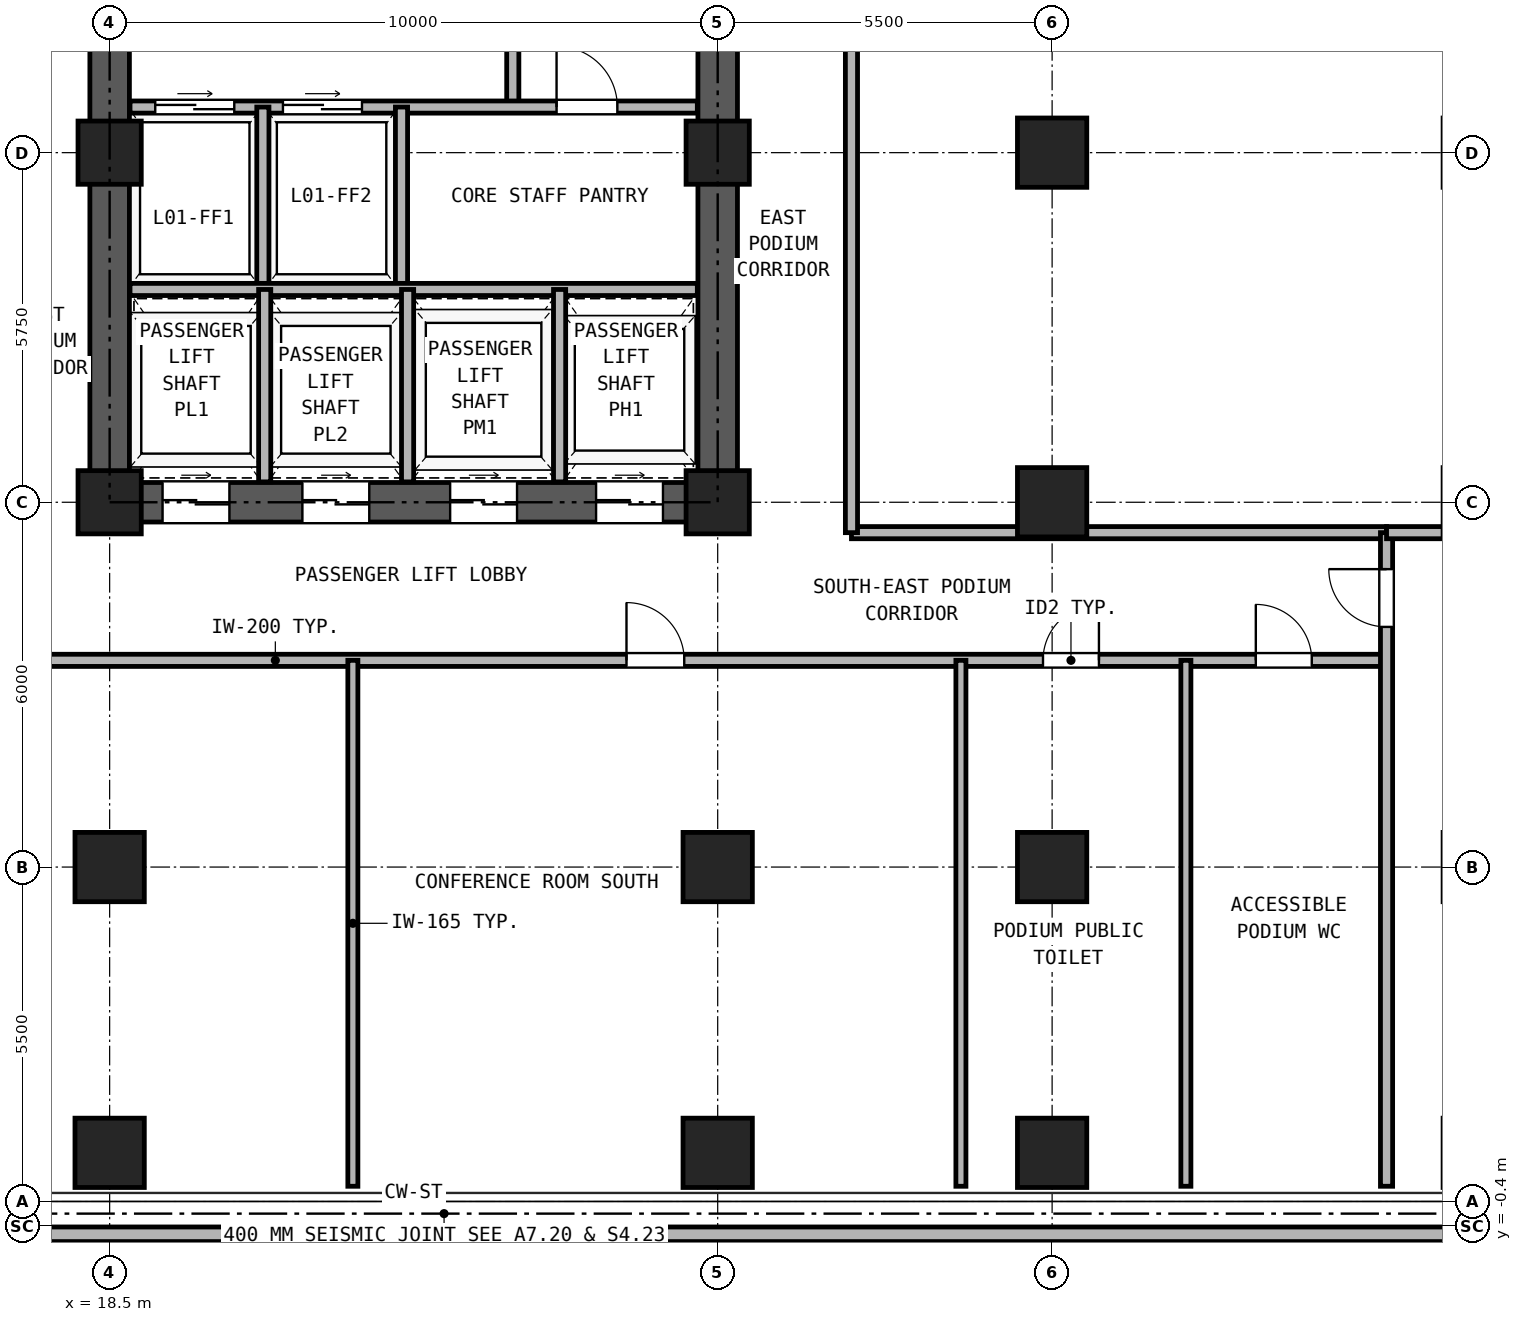
"""IFC4 building model, lengths in metres.
Left out: names, types, materials, properties, quantities, classifications, styles, units other than length and angle.
Written with IfcOpenShell. Run it as: python <this file> out.ifc"""

import sys

from ifc_helpers import new_model, si_unit, direction, frame, frame_2d, origin, origin_2d, place, context, subcontext, project, spatial, rectangle, hollow_rectangle, extrude, source, transform, mapped, element, fill, save


model = new_model("IFC4")
c1 = context("Model", 3, precision=1e-05, world=origin(), true_north=direction((0.0, 1.0)))
c2 = subcontext(c1, "Body", "Model", "MODEL_VIEW")
j1 = project(units=[si_unit("LENGTHUNIT", "METRE"), si_unit("PLANEANGLEUNIT", "RADIAN")], contexts=[c1])
p1 = place(None, origin())
s1 = spatial("IfcSite", under=j1, at=p1, CompositionType="ELEMENT")
p2 = place(p1, origin())
s2 = spatial("IfcBuilding", under=s1, at=p2, CompositionType="ELEMENT")
p3 = place(p2, frame((0.0, 0.0, 4.5)))
s3 = spatial("IfcBuildingStorey", under=s2, at=p3, CompositionType="ELEMENT", Elevation=4.5)
m1 = source(origin(), c2, "Body", "SweptSolid", [
    extrude(hollow_rectangle(XDim=1.14, YDim=1.14, WallThickness=0.07, at=origin_2d()), origin(), (0.0, 0.0, 1.0), 4.18),
])
for number, where, z_axis, x_axis in (
    (1, (18.5, 0.8, 0.0), (0.0, 0.0, 1.0), (1.0, 0.0, 0.0)),
    (2, (28.5, 0.8, 0.0), (0.0, 0.0, 1.0), (1.0, 0.0, 0.0)),
    (3, (34.0, 0.8, 0.0), (0.0, 0.0, 1.0), (1.0, 0.0, 0.0)),
    (4, (18.5, 5.5, 0.0), (0.0, 0.0, 1.0), (1.0, 0.0, 0.0)),
):
    element("IfcColumn", number, at=place(p3, frame(where, z_axis=z_axis, x_axis=x_axis)), inside=s3, PredefinedType="COLUMN", context=c2, shape_type="MappedRepresentation", body=[
        mapped(m1, transform((0.0, 0.0, 0.0), x_axis=(1.0, 0.0, 0.0), y_axis=(0.0, 1.0, 0.0), z_axis=(0.0, 0.0, 1.0), scale=1.0)),
    ])
m2 = source(origin(), c2, "Body", "SweptSolid", [
    extrude(hollow_rectangle(XDim=1.04, YDim=1.04, WallThickness=0.065, at=origin_2d()), origin(), (0.0, 0.0, 1.0), 4.18),
])
for number, where, z_axis, x_axis in (
    (5, (18.5, 11.5, 0.0), (0.0, 0.0, 1.0), (1.0, 0.0, 0.0)),
    (6, (18.5, 17.25, 0.0), (0.0, 0.0, 1.0), (1.0, 0.0, 0.0)),
):
    element("IfcColumn", number, at=place(p3, frame(where, z_axis=z_axis, x_axis=x_axis)), inside=s3, PredefinedType="COLUMN", context=c2, shape_type="MappedRepresentation", body=[
        mapped(m2, transform((0.0, 0.0, 0.0), x_axis=(1.0, 0.0, 0.0), y_axis=(0.0, 1.0, 0.0), z_axis=(0.0, 0.0, 1.0), scale=1.0)),
    ])
p4 = place(p3, frame((28.5, 5.5, 0.0), z_axis=(0.0, 0.0, 1.0), x_axis=(1.0, 0.0, 0.0)))
e7 = element("IfcColumn", 7, at=p4, inside=s3, PredefinedType="COLUMN", context=c2, shape_type="MappedRepresentation", body=[
    mapped(m1, transform((0.0, 0.0, 0.0), x_axis=(1.0, 0.0, 0.0), y_axis=(0.0, 1.0, 0.0), z_axis=(0.0, 0.0, 1.0), scale=1.0)),
])
for number, where, z_axis, x_axis in (
    (8, (28.5, 11.5, 0.0), (0.0, 0.0, 1.0), (1.0, 0.0, 0.0)),
    (9, (28.5, 17.25, 0.0), (0.0, 0.0, 1.0), (1.0, 0.0, 0.0)),
):
    element("IfcColumn", number, at=place(p3, frame(where, z_axis=z_axis, x_axis=x_axis)), inside=s3, PredefinedType="COLUMN", context=c2, shape_type="MappedRepresentation", body=[
        mapped(m2, transform((0.0, 0.0, 0.0), x_axis=(1.0, 0.0, 0.0), y_axis=(0.0, 1.0, 0.0), z_axis=(0.0, 0.0, 1.0), scale=1.0)),
    ])
for number, where, z_axis, x_axis in (
    (10, (34.0, 5.5, 0.0), (0.0, 0.0, 1.0), (1.0, 0.0, 0.0)),
    (11, (34.0, 11.5, 0.0), (0.0, 0.0, 1.0), (1.0, 0.0, 0.0)),
    (12, (34.0, 17.25, 0.0), (0.0, 0.0, 1.0), (1.0, 0.0, 0.0)),
):
    element("IfcColumn", number, at=place(p3, frame(where, z_axis=z_axis, x_axis=x_axis)), inside=s3, PredefinedType="COLUMN", context=c2, shape_type="MappedRepresentation", body=[
        mapped(m1, transform((0.0, 0.0, 0.0), x_axis=(1.0, 0.0, 0.0), y_axis=(0.0, 1.0, 0.0), z_axis=(0.0, 0.0, 1.0), scale=1.0)),
    ])
p5 = place(p3, frame((0.2, -0.54, 0.0), z_axis=(0.0, 0.0, 1.0), x_axis=(1.0, 0.0, 0.0)))
e13 = element("IfcWall", 13, at=p5, inside=s3, PredefinedType="SOLIDWALL", context=c2, shape_type="SweptSolid", body=[
    extrude(rectangle(XDim=47.34, YDim=0.24, at=frame_2d((23.67, 0.0))), origin(), (0.0, 0.0, 1.0), 4.18),
])
p6 = place(p3, frame((18.175, 11.5, 0.0), z_axis=(0.0, 0.0, 1.0), x_axis=(1.0, 0.0, 0.0)))
e14 = element("IfcWall", 14, at=p6, inside=s3, PredefinedType="SHEAR", context=c2, shape_type="SweptSolid", body=[
    extrude(rectangle(XDim=10.65, YDim=0.65, at=frame_2d((5.325, 0.0))), origin(), (0.0, 0.0, 1.0), 4.18),
])
p7 = place(p6, frame((1.195, 0.0, 0.0)))
e15 = element("IfcOpeningElement", 15, at=p7, cuts=e14, PredefinedType="OPENING", context=c2, shape_type="SweptSolid", body=[
    extrude(rectangle(XDim=1.1, YDim=2.25, at=frame_2d((0.55, 1.125))), frame((0.0, 0.335, 0.0), z_axis=(0.0, -1.0, 0.0), x_axis=(1.0, 0.0, 0.0)), (0.0, 0.0, 1.0), 0.67),
])
p8 = place(p6, frame((3.495, 0.0, 0.0)))
e16 = element("IfcOpeningElement", 16, at=p8, cuts=e14, PredefinedType="OPENING", context=c2, shape_type="SweptSolid", body=[
    extrude(rectangle(XDim=1.1, YDim=2.25, at=frame_2d((0.55, 1.125))), frame((0.0, 0.335, 0.0), z_axis=(0.0, -1.0, 0.0), x_axis=(1.0, 0.0, 0.0)), (0.0, 0.0, 1.0), 0.67),
])
p9 = place(p6, frame((5.925, 0.0, 0.0)))
e17 = element("IfcOpeningElement", 17, at=p9, cuts=e14, PredefinedType="OPENING", context=c2, shape_type="SweptSolid", body=[
    extrude(rectangle(XDim=1.1, YDim=2.25, at=frame_2d((0.55, 1.125))), frame((0.0, 0.335, 0.0), z_axis=(0.0, -1.0, 0.0), x_axis=(1.0, 0.0, 0.0)), (0.0, 0.0, 1.0), 0.67),
])
p10 = place(p6, frame((8.325, 0.0, 0.0)))
e18 = element("IfcOpeningElement", 18, at=p10, cuts=e14, PredefinedType="OPENING", context=c2, shape_type="SweptSolid", body=[
    extrude(rectangle(XDim=1.1, YDim=2.25, at=frame_2d((0.55, 1.125))), frame((0.0, 0.335, 0.0), z_axis=(0.0, -1.0, 0.0), x_axis=(1.0, 0.0, 0.0)), (0.0, 0.0, 1.0), 0.67),
])
p11 = place(p3, frame((18.5, 11.825, 0.0), z_axis=(0.0, 0.0, 1.0), x_axis=(0.0, 1.0, 0.0)))
e19 = element("IfcWall", 19, at=p11, inside=s3, PredefinedType="SHEAR", context=c2, shape_type="SweptSolid", body=[
    extrude(rectangle(XDim=16.6, YDim=0.65, at=frame_2d((8.3, 0.0))), origin(), (0.0, 0.0, 1.0), 4.18),
])
p12 = place(p11, frame((7.325, 0.0, 0.0)))
e20 = element("IfcOpeningElement", 20, at=p12, cuts=e19, PredefinedType="OPENING", context=c2, shape_type="SweptSolid", body=[
    extrude(rectangle(XDim=1.15, YDim=2.2, at=frame_2d((0.575, 1.1))), frame((0.0, 0.335, 0.0), z_axis=(0.0, -1.0, 0.0), x_axis=(1.0, 0.0, 0.0)), (0.0, 0.0, 1.0), 0.67),
])
p13 = place(p3, frame((28.5, 11.825, 0.0), z_axis=(0.0, 0.0, 1.0), x_axis=(0.0, 1.0, 0.0)))
e21 = element("IfcWall", 21, at=p13, inside=s3, PredefinedType="SHEAR", context=c2, shape_type="SweptSolid", body=[
    extrude(rectangle(XDim=16.6, YDim=0.65, at=frame_2d((8.3, 0.0))), origin(), (0.0, 0.0, 1.0), 4.18),
])
p14 = place(p13, frame((7.325, 0.0, 0.0)))
e22 = element("IfcOpeningElement", 22, at=p14, cuts=e21, PredefinedType="OPENING", context=c2, shape_type="SweptSolid", body=[
    extrude(rectangle(XDim=1.15, YDim=2.2, at=frame_2d((0.575, 1.1))), frame((0.0, 0.335, 0.0), z_axis=(0.0, -1.0, 0.0), x_axis=(1.0, 0.0, 0.0)), (0.0, 0.0, 1.0), 0.67),
])
p15 = place(p3, frame((25.13, 18.0, 0.0), z_axis=(0.0, 0.0, 1.0), x_axis=(0.0, 1.0, 0.0)))
e23 = element("IfcWall", 23, at=p15, inside=s3, PredefinedType="PARTITIONING", context=c2, shape_type="SweptSolid", body=[
    extrude(rectangle(XDim=3.39, YDim=0.2, at=frame_2d((1.695, 0.0))), origin(), (0.0, 0.0, 1.0), 4.18),
])
p16 = place(p15, frame((1.1, 0.0, 0.0)))
e24 = element("IfcOpeningElement", 24, at=p16, cuts=e23, PredefinedType="OPENING", context=c2, shape_type="SweptSolid", body=[
    extrude(rectangle(XDim=1.15, YDim=2.2, at=frame_2d((0.575, 1.1))), frame((0.0, 0.11, 0.0), z_axis=(0.0, -1.0, 0.0), x_axis=(1.0, 0.0, 0.0)), (0.0, 0.0, 1.0), 0.22),
])
p17 = place(p3, frame((18.835, 18.0, 0.0), z_axis=(0.0, 0.0, 1.0), x_axis=(1.0, 0.0, 0.0)))
e25 = element("IfcWall", 25, at=p17, inside=s3, PredefinedType="PARTITIONING", context=c2, shape_type="SweptSolid", body=[
    extrude(rectangle(XDim=9.33, YDim=0.2, at=frame_2d((4.665, 0.0))), origin(), (0.0, 0.0, 1.0), 4.18),
])
p18 = place(p17, frame((0.415, 0.0, 0.0)))
e26 = element("IfcOpeningElement", 26, at=p18, cuts=e25, PredefinedType="OPENING", context=c2, shape_type="SweptSolid", body=[
    extrude(rectangle(XDim=1.3, YDim=2.3, at=frame_2d((0.65, 1.15))), frame((0.0, 0.11, 0.0), z_axis=(0.0, -1.0, 0.0), x_axis=(1.0, 0.0, 0.0)), (0.0, 0.0, 1.0), 0.22),
])
p19 = place(p17, frame((2.515, 0.0, 0.0)))
e27 = element("IfcOpeningElement", 27, at=p19, cuts=e25, PredefinedType="OPENING", context=c2, shape_type="SweptSolid", body=[
    extrude(rectangle(XDim=1.3, YDim=2.3, at=frame_2d((0.65, 1.15))), frame((0.0, 0.11, 0.0), z_axis=(0.0, -1.0, 0.0), x_axis=(1.0, 0.0, 0.0)), (0.0, 0.0, 1.0), 0.22),
])
p20 = place(p17, frame((7.015, 0.0, 0.0)))
e28 = element("IfcOpeningElement", 28, at=p20, cuts=e25, PredefinedType="OPENING", context=c2, shape_type="SweptSolid", body=[
    extrude(rectangle(XDim=1.0, YDim=2.15, at=frame_2d((0.5, 1.075))), frame((0.0, 0.11, 0.0), z_axis=(0.0, -1.0, 0.0), x_axis=(1.0, 0.0, 0.0)), (0.0, 0.0, 1.0), 0.22),
])
for number, where, z_axis, x_axis in (
    (29, (21.02, 15.0, 0.0), (0.0, 0.0, 1.0), (0.0, 1.0, 0.0)),
    (30, (23.3, 15.0, 0.0), (0.0, 0.0, 1.0), (0.0, 1.0, 0.0)),
):
    element("IfcWall", number, at=place(p3, frame(where, z_axis=z_axis, x_axis=x_axis)), inside=s3, PredefinedType="PARTITIONING", context=c2, shape_type="SweptSolid", body=[
        extrude(rectangle(XDim=3.0, YDim=0.2, at=frame_2d((1.5, 0.0))), origin(), (0.0, 0.0, 1.0), 4.18),
    ])
p21 = place(p3, frame((18.835, 15.0, 0.0), z_axis=(0.0, 0.0, 1.0), x_axis=(1.0, 0.0, 0.0)))
e31 = element("IfcWall", 31, at=p21, inside=s3, PredefinedType="PARTITIONING", context=c2, shape_type="SweptSolid", body=[
    extrude(rectangle(XDim=9.33, YDim=0.2, at=frame_2d((4.665, 0.0))), origin(), (0.0, 0.0, 1.0), 4.18),
])
for number, where, z_axis, x_axis in (
    (32, (21.05, 11.835, 0.0), (0.0, 0.0, 1.0), (0.0, 1.0, 0.0)),
    (33, (23.4, 11.835, 0.0), (0.0, 0.0, 1.0), (0.0, 1.0, 0.0)),
    (34, (25.9, 11.835, 0.0), (0.0, 0.0, 1.0), (0.0, 1.0, 0.0)),
):
    element("IfcWall", number, at=place(p3, frame(where, z_axis=z_axis, x_axis=x_axis)), inside=s3, PredefinedType="PARTITIONING", context=c2, shape_type="SweptSolid", body=[
        extrude(rectangle(XDim=3.165, YDim=0.2, at=frame_2d((1.583, 0.0))), origin(), (0.0, 0.0, 1.0), 4.18),
    ])
p22 = place(p3, frame((7.5, 8.9, 0.0), z_axis=(0.0, 0.0, 1.0), x_axis=(1.0, 0.0, 0.0)))
e35 = element("IfcWall", 35, at=p22, inside=s3, PredefinedType="PARTITIONING", context=c2, shape_type="SweptSolid", body=[
    extrude(rectangle(XDim=32.0, YDim=0.2, at=frame_2d((16.0, 0.0))), origin(), (0.0, 0.0, 1.0), 4.18),
])
p23 = place(p22, frame((7.0, 0.0, 0.0)))
e36 = element("IfcOpeningElement", 36, at=p23, cuts=e35, PredefinedType="OPENING", context=c2, shape_type="SweptSolid", body=[
    extrude(rectangle(XDim=0.95, YDim=2.15, at=frame_2d((0.475, 1.075))), frame((0.0, 0.11, 0.0), z_axis=(0.0, -1.0, 0.0), x_axis=(1.0, 0.0, 0.0)), (0.0, 0.0, 1.0), 0.22),
])
p24 = place(p22, frame((19.5, 0.0, 0.0)))
e37 = element("IfcOpeningElement", 37, at=p24, cuts=e35, PredefinedType="OPENING", context=c2, shape_type="SweptSolid", body=[
    extrude(rectangle(XDim=0.95, YDim=2.15, at=frame_2d((0.475, 1.075))), frame((0.0, 0.11, 0.0), z_axis=(0.0, -1.0, 0.0), x_axis=(1.0, 0.0, 0.0)), (0.0, 0.0, 1.0), 0.22),
])
p25 = place(p22, frame((26.35, 0.0, 0.0)))
e38 = element("IfcOpeningElement", 38, at=p25, cuts=e35, PredefinedType="OPENING", context=c2, shape_type="SweptSolid", body=[
    extrude(rectangle(XDim=0.92, YDim=2.1, at=frame_2d((0.46, 1.05))), frame((0.0, 0.11, 0.0), z_axis=(0.0, -1.0, 0.0), x_axis=(1.0, 0.0, 0.0)), (0.0, 0.0, 1.0), 0.22),
])
p26 = place(p22, frame((29.85, 0.0, 0.0)))
e39 = element("IfcOpeningElement", 39, at=p26, cuts=e35, PredefinedType="OPENING", context=c2, shape_type="SweptSolid", body=[
    extrude(rectangle(XDim=0.92, YDim=2.1, at=frame_2d((0.46, 1.05))), frame((0.0, 0.11, 0.0), z_axis=(0.0, -1.0, 0.0), x_axis=(1.0, 0.0, 0.0)), (0.0, 0.0, 1.0), 0.22),
])
p27 = place(p3, frame((30.7, 11.0, 0.0), z_axis=(0.0, 0.0, 1.0), x_axis=(1.0, 0.0, 0.0)))
e40 = element("IfcWall", 40, at=p27, inside=s3, PredefinedType="PARTITIONING", context=c2, shape_type="SweptSolid", body=[
    extrude(rectangle(XDim=8.8, YDim=0.2, at=frame_2d((4.4, 0.0))), origin(), (0.0, 0.0, 1.0), 4.18),
])
p28 = place(p3, frame((30.7, 11.0, 0.0), z_axis=(0.0, 0.0, 1.0), x_axis=(0.0, 1.0, 0.0)))
e41 = element("IfcWall", 41, at=p28, inside=s3, PredefinedType="PARTITIONING", context=c2, shape_type="SweptSolid", body=[
    extrude(rectangle(XDim=18.25, YDim=0.2, at=frame_2d((9.125, 0.0))), origin(), (0.0, 0.0, 1.0), 4.18),
])
p29 = place(p28, frame((8.625, 0.0, 0.0)))
e42 = element("IfcOpeningElement", 42, at=p29, cuts=e41, PredefinedType="OPENING", context=c2, shape_type="SweptSolid", body=[
    extrude(rectangle(XDim=0.95, YDim=2.15, at=frame_2d((0.475, 1.075))), frame((0.0, 0.11, 0.0), z_axis=(0.0, -1.0, 0.0), x_axis=(1.0, 0.0, 0.0)), (0.0, 0.0, 1.0), 0.22),
])
p30 = place(p3, frame((39.5, 0.25, 0.0), z_axis=(0.0, 0.0, 1.0), x_axis=(0.0, 1.0, 0.0)))
e43 = element("IfcWall", 43, at=p30, inside=s3, PredefinedType="PARTITIONING", context=c2, shape_type="SweptSolid", body=[
    extrude(rectangle(XDim=10.75, YDim=0.2, at=frame_2d((5.375, 0.0))), origin(), (0.0, 0.0, 1.0), 4.18),
])
p31 = place(p30, frame((9.2, 0.0, 0.0)))
e44 = element("IfcOpeningElement", 44, at=p31, cuts=e43, PredefinedType="OPENING", context=c2, shape_type="SweptSolid", body=[
    extrude(rectangle(XDim=0.95, YDim=2.15, at=frame_2d((0.475, 1.075))), frame((0.0, 0.11, 0.0), z_axis=(0.0, -1.0, 0.0), x_axis=(1.0, 0.0, 0.0)), (0.0, 0.0, 1.0), 0.22),
])
p32 = place(p3, frame((39.5, 11.0, 0.0), z_axis=(0.0, 0.0, 1.0), x_axis=(1.0, 0.0, 0.0)))
e45 = element("IfcWall", 45, at=p32, inside=s3, PredefinedType="PARTITIONING", context=c2, shape_type="SweptSolid", body=[
    extrude(rectangle(XDim=7.25, YDim=0.2, at=frame_2d((3.625, 0.0))), origin(), (0.0, 0.0, 1.0), 4.18),
])
for number, where, z_axis, x_axis in (
    (46, (22.5, 0.25, 0.0), (0.0, 0.0, 1.0), (0.0, 1.0, 0.0)),
    (47, (32.5, 0.25, 0.0), (0.0, 0.0, 1.0), (0.0, 1.0, 0.0)),
    (48, (36.2, 0.25, 0.0), (0.0, 0.0, 1.0), (0.0, 1.0, 0.0)),
):
    element("IfcWall", number, at=place(p3, frame(where, z_axis=z_axis, x_axis=x_axis)), inside=s3, PredefinedType="PARTITIONING", context=c2, shape_type="SweptSolid", body=[
        extrude(rectangle(XDim=8.65, YDim=0.165, at=frame_2d((4.325, 0.0))), origin(), (0.0, 0.0, 1.0), 4.18),
    ])
p33 = place(p18, origin())
e49 = element("IfcDoor", 49, at=p33, inside=s3, OperationType="DOUBLE_DOOR_SLIDING", PredefinedType="DOOR", context=c2, shape_type="SweptSolid", body=[
    extrude(rectangle(XDim=1.3, YDim=2.3, at=frame_2d((0.65, 1.15))), frame((0.0, 0.025, 0.0), z_axis=(0.0, -1.0, 0.0), x_axis=(1.0, 0.0, 0.0)), (0.0, 0.0, 1.0), 0.05),
])
fill(e26, e49)
p34 = place(p19, origin())
e50 = element("IfcDoor", 50, at=p34, inside=s3, OperationType="DOUBLE_DOOR_SLIDING", PredefinedType="DOOR", context=c2, shape_type="SweptSolid", body=[
    extrude(rectangle(XDim=1.3, YDim=2.3, at=frame_2d((0.65, 1.15))), frame((0.0, 0.025, 0.0), z_axis=(0.0, -1.0, 0.0), x_axis=(1.0, 0.0, 0.0)), (0.0, 0.0, 1.0), 0.05),
])
fill(e27, e50)
p35 = place(p20, frame((1.0, 0.0, 0.0), z_axis=(0.0, 0.0, 1.0), x_axis=(-1.0, 0.0, 0.0)))
e51 = element("IfcDoor", 51, at=p35, inside=s3, OperationType="SINGLE_SWING_LEFT", PredefinedType="DOOR", context=c2, shape_type="SweptSolid", body=[
    extrude(rectangle(XDim=1.0, YDim=2.15, at=frame_2d((0.5, 1.075))), frame((0.0, 0.025, 0.0), z_axis=(0.0, -1.0, 0.0), x_axis=(1.0, 0.0, 0.0)), (0.0, 0.0, 1.0), 0.05),
])
fill(e28, e51)
p36 = place(p7, frame((1.1, 0.0, 0.0), z_axis=(0.0, 0.0, 1.0), x_axis=(-1.0, 0.0, 0.0)))
e52 = element("IfcDoor", 52, at=p36, inside=s3, OperationType="DOUBLE_DOOR_SLIDING", PredefinedType="DOOR", context=c2, shape_type="SweptSolid", body=[
    extrude(rectangle(XDim=1.1, YDim=2.25, at=frame_2d((0.55, 1.125))), frame((0.0, 0.025, 0.0), z_axis=(0.0, -1.0, 0.0), x_axis=(1.0, 0.0, 0.0)), (0.0, 0.0, 1.0), 0.05),
])
fill(e15, e52)
p37 = place(p8, frame((1.1, 0.0, 0.0), z_axis=(0.0, 0.0, 1.0), x_axis=(-1.0, 0.0, 0.0)))
e53 = element("IfcDoor", 53, at=p37, inside=s3, OperationType="DOUBLE_DOOR_SLIDING", PredefinedType="DOOR", context=c2, shape_type="SweptSolid", body=[
    extrude(rectangle(XDim=1.1, YDim=2.25, at=frame_2d((0.55, 1.125))), frame((0.0, 0.025, 0.0), z_axis=(0.0, -1.0, 0.0), x_axis=(1.0, 0.0, 0.0)), (0.0, 0.0, 1.0), 0.05),
])
fill(e16, e53)
p38 = place(p9, frame((1.1, 0.0, 0.0), z_axis=(0.0, 0.0, 1.0), x_axis=(-1.0, 0.0, 0.0)))
e54 = element("IfcDoor", 54, at=p38, inside=s3, OperationType="DOUBLE_DOOR_SLIDING", PredefinedType="DOOR", context=c2, shape_type="SweptSolid", body=[
    extrude(rectangle(XDim=1.1, YDim=2.25, at=frame_2d((0.55, 1.125))), frame((0.0, 0.025, 0.0), z_axis=(0.0, -1.0, 0.0), x_axis=(1.0, 0.0, 0.0)), (0.0, 0.0, 1.0), 0.05),
])
fill(e17, e54)
p39 = place(p10, frame((1.1, 0.0, 0.0), z_axis=(0.0, 0.0, 1.0), x_axis=(-1.0, 0.0, 0.0)))
e55 = element("IfcDoor", 55, at=p39, inside=s3, OperationType="DOUBLE_DOOR_SLIDING", PredefinedType="DOOR", context=c2, shape_type="SweptSolid", body=[
    extrude(rectangle(XDim=1.1, YDim=2.25, at=frame_2d((0.55, 1.125))), frame((0.0, 0.025, 0.0), z_axis=(0.0, -1.0, 0.0), x_axis=(1.0, 0.0, 0.0)), (0.0, 0.0, 1.0), 0.05),
])
fill(e18, e55)
p40 = place(p24, frame((0.95, 0.0, 0.0), z_axis=(0.0, 0.0, 1.0), x_axis=(-1.0, 0.0, 0.0)))
e56 = element("IfcDoor", 56, at=p40, inside=s3, OperationType="SINGLE_SWING_LEFT", PredefinedType="DOOR", context=c2, shape_type="SweptSolid", body=[
    extrude(rectangle(XDim=0.95, YDim=2.15, at=frame_2d((0.475, 1.075))), frame((0.0, 0.025, 0.0), z_axis=(0.0, -1.0, 0.0), x_axis=(1.0, 0.0, 0.0)), (0.0, 0.0, 1.0), 0.05),
])
fill(e37, e56)
p41 = place(p25, frame((0.92, 0.0, 0.0), z_axis=(0.0, 0.0, 1.0), x_axis=(-1.0, 0.0, 0.0)))
e57 = element("IfcDoor", 57, at=p41, inside=s3, OperationType="SINGLE_SWING_RIGHT", PredefinedType="DOOR", context=c2, shape_type="SweptSolid", body=[
    extrude(rectangle(XDim=0.92, YDim=2.1, at=frame_2d((0.46, 1.05))), frame((0.0, 0.025, 0.0), z_axis=(0.0, -1.0, 0.0), x_axis=(1.0, 0.0, 0.0)), (0.0, 0.0, 1.0), 0.05),
])
fill(e38, e57)
p42 = place(p26, frame((0.92, 0.0, 0.0), z_axis=(0.0, 0.0, 1.0), x_axis=(-1.0, 0.0, 0.0)))
e58 = element("IfcDoor", 58, at=p42, inside=s3, OperationType="SINGLE_SWING_LEFT", PredefinedType="DOOR", context=c2, shape_type="SweptSolid", body=[
    extrude(rectangle(XDim=0.92, YDim=2.1, at=frame_2d((0.46, 1.05))), frame((0.0, 0.025, 0.0), z_axis=(0.0, -1.0, 0.0), x_axis=(1.0, 0.0, 0.0)), (0.0, 0.0, 1.0), 0.05),
])
fill(e39, e58)
p43 = place(p31, origin())
e59 = element("IfcDoor", 59, at=p43, inside=s3, OperationType="SINGLE_SWING_RIGHT", PredefinedType="DOOR", context=c2, shape_type="SweptSolid", body=[
    extrude(rectangle(XDim=0.95, YDim=2.15, at=frame_2d((0.475, 1.075))), frame((0.0, 0.025, 0.0), z_axis=(0.0, -1.0, 0.0), x_axis=(1.0, 0.0, 0.0)), (0.0, 0.0, 1.0), 0.05),
])
fill(e44, e59)
save(model, sys.argv[1])
